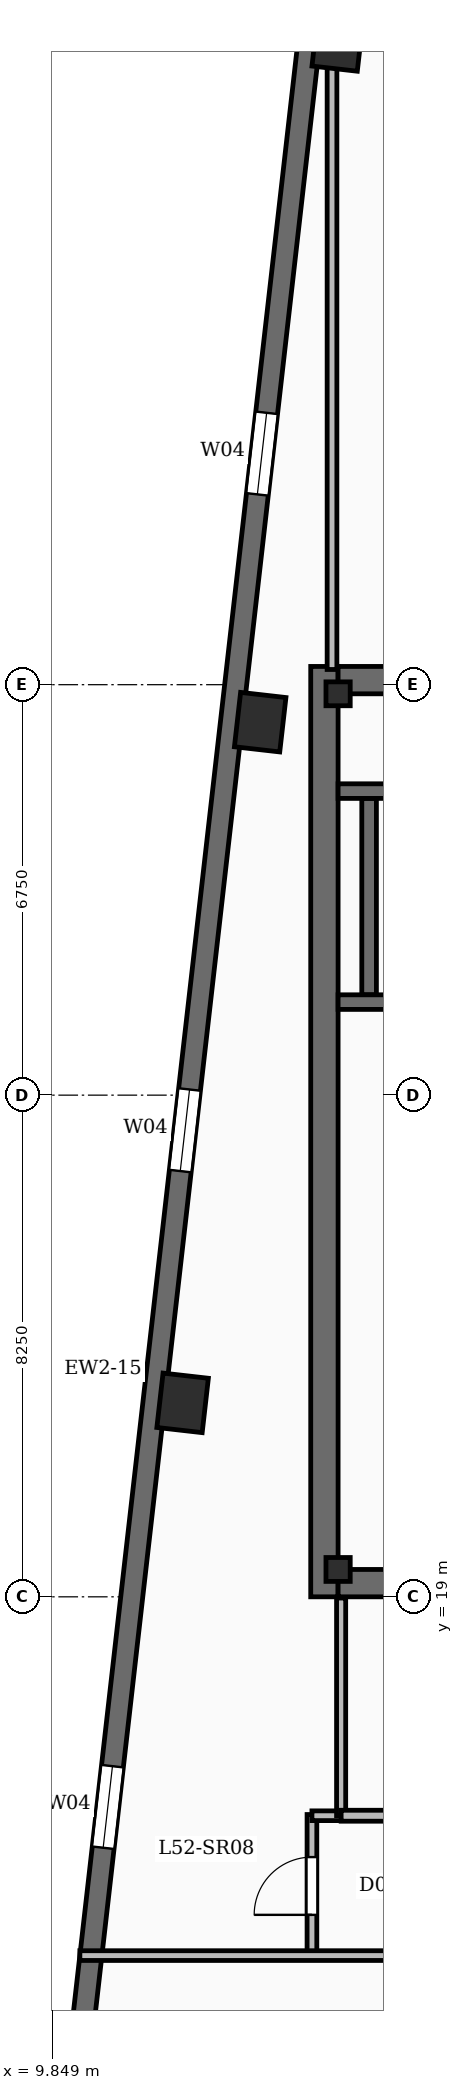
"""IFC4 building model, lengths in metres.
Left out: names, types, materials, properties, quantities, classifications, styles, units other than length and angle.
Written with IfcOpenShell. Run it as: python <this file> out.ifc"""

import sys

from ifc_helpers import new_model, si_unit, direction, frame, frame_2d, origin, origin_2d, place, context, subcontext, project, spatial, rectangle, i_section, extrude, element, fill, save


model = new_model("IFC4")
c1 = context("Model", 3, precision=1e-05, world=origin(), true_north=direction((0.0, 1.0)))
c2 = subcontext(c1, "Body", "Model", "MODEL_VIEW")
j1 = project(units=[si_unit("LENGTHUNIT", "METRE"), si_unit("PLANEANGLEUNIT", "RADIAN")], contexts=[c1])
p1 = place(None, origin())
s1 = spatial("IfcSite", under=j1, at=p1, CompositionType="ELEMENT")
p2 = place(p1, origin())
s2 = spatial("IfcBuilding", under=s1, at=p2, CompositionType="ELEMENT")
p3 = place(p2, frame((0.0, 0.0, 216.15)))
s3 = spatial("IfcBuildingStorey", under=s2, at=p3, CompositionType="ELEMENT", Elevation=216.15)
p4 = place(p3, frame((14.325, 19.0, -0.45), z_axis=(0.0, 0.0, 1.0), x_axis=(0.0, 1.0, 0.0)))
e1 = element("IfcWall", 1, at=p4, inside=s3, PredefinedType="SHEAR", context=c2, shape_type="SweptSolid", body=[
    extrude(rectangle(XDim=15.3, YDim=0.45, at=frame_2d((7.65, 0.0))), origin(), (0.0, 0.0, 1.0), 4.98),
])
for number, where, z_axis, x_axis in (
    (2, (14.55, 19.225, -0.45), (0.0, 0.0, 1.0), (1.0, 0.0, 0.0)),
    (3, (14.55, 34.075, -0.45), (0.0, 0.0, 1.0), (1.0, 0.0, 0.0)),
):
    element("IfcWall", number, at=place(p3, frame(where, z_axis=z_axis, x_axis=x_axis)), inside=s3, PredefinedType="SHEAR", context=c2, shape_type="SweptSolid", body=[
        extrude(rectangle(XDim=9.8, YDim=0.45, at=frame_2d((4.9, 0.0))), origin(), (0.0, 0.0, 1.0), 4.98),
    ])
for number, where, z_axis, x_axis in (
    (4, (14.55, 19.45, -0.45), (0.0, 0.0, 1.0), (1.0, 0.0, 0.0)),
    (5, (14.55, 33.85, -0.45), (0.0, 0.0, 1.0), (1.0, 0.0, 0.0)),
):
    element("IfcColumn", number, at=place(p3, frame(where, z_axis=z_axis, x_axis=x_axis)), inside=s3, PredefinedType="COLUMN", context=c2, shape_type="SweptSolid", body=[
        extrude(i_section(OverallWidth=0.399, OverallDepth=0.393, WebThickness=0.023, FlangeThickness=0.037, FilletRadius=0.02, at=origin_2d()), origin(), (0.0, 0.0, 1.0), 4.98),
    ])
for number, where, z_axis, x_axis in (
    (6, (14.544, 44.578, -0.45), (0.0, 0.0, 1.0), (0.113, 0.994, 0.0)),
    (7, (13.269, 33.384, -0.45), (0.0, 0.0, 1.0), (0.113, 0.994, 0.0)),
    (8, (11.993, 22.189, -0.45), (0.0, 0.0, 1.0), (0.113, 0.994, 0.0)),
):
    element("IfcColumn", number, at=place(p3, frame(where, z_axis=z_axis, x_axis=x_axis)), inside=s3, PredefinedType="COLUMN", context=c2, shape_type="SweptSolid", body=[
        extrude(rectangle(XDim=0.9, YDim=0.75, at=origin_2d()), origin(), (0.0, 0.0, 1.0), 4.98),
    ])
p5 = place(p3, frame((10.211, 10.701, 0.0), z_axis=(0.0, 0.0, 1.0), x_axis=(0.113203107947, 0.993571867733, 0.0)))
e9 = element("IfcWall", 9, at=p5, inside=s3, PredefinedType="SOLIDWALL", context=c2, shape_type="SweptSolid", body=[
    extrude(rectangle(XDim=34.5, YDim=0.36, at=frame_2d((17.25, 0.0))), origin(), (0.0, 0.0, 1.0), 4.53),
])
p6 = place(p5, frame((4.2, 0.0, 0.88)))
e10 = element("IfcOpeningElement", 10, at=p6, cuts=e9, PredefinedType="OPENING", context=c2, shape_type="SweptSolid", body=[
    extrude(rectangle(XDim=1.35, YDim=2.2, at=frame_2d((0.675, 1.1))), frame((0.0, 0.19, 0.0), z_axis=(0.0, -1.0, 0.0), x_axis=(1.0, 0.0, 0.0)), (0.0, 0.0, 1.0), 0.38),
])
p7 = place(p5, frame((15.4, 0.0, 0.88)))
e11 = element("IfcOpeningElement", 11, at=p7, cuts=e9, PredefinedType="OPENING", context=c2, shape_type="SweptSolid", body=[
    extrude(rectangle(XDim=1.35, YDim=2.2, at=frame_2d((0.675, 1.1))), frame((0.0, 0.19, 0.0), z_axis=(0.0, -1.0, 0.0), x_axis=(1.0, 0.0, 0.0)), (0.0, 0.0, 1.0), 0.38),
])
p8 = place(p5, frame((26.6, 0.0, 0.88)))
e12 = element("IfcOpeningElement", 12, at=p8, cuts=e9, PredefinedType="OPENING", context=c2, shape_type="SweptSolid", body=[
    extrude(rectangle(XDim=1.35, YDim=2.2, at=frame_2d((0.675, 1.1))), frame((0.0, 0.19, 0.0), z_axis=(0.0, -1.0, 0.0), x_axis=(1.0, 0.0, 0.0)), (0.0, 0.0, 1.0), 0.38),
])
p9 = place(p3, frame((24.35, 28.78, 0.0), z_axis=(0.0, 0.0, 1.0), x_axis=(-1.0, 0.0, 0.0)))
e13 = element("IfcWall", 13, at=p9, inside=s3, PredefinedType="SOLIDWALL", context=c2, shape_type="SweptSolid", body=[
    extrude(rectangle(XDim=9.8, YDim=0.24, at=frame_2d((4.9, 0.0))), origin(), (0.0, 0.0, 1.0), 4.53),
])
p10 = place(p9, frame((7.83, 0.0, 0.0)))
e14 = element("IfcOpeningElement", 14, at=p10, cuts=e13, PredefinedType="OPENING", context=c2, shape_type="SweptSolid", body=[
    extrude(rectangle(XDim=1.1, YDim=2.15, at=frame_2d((0.55, 1.075))), frame((0.0, 0.13, 0.0), z_axis=(0.0, -1.0, 0.0), x_axis=(1.0, 0.0, 0.0)), (0.0, 0.0, 1.0), 0.26),
])
p11 = place(p3, frame((14.55, 32.25, 0.0), z_axis=(0.0, 0.0, 1.0), x_axis=(1.0, 0.0, 0.0)))
e15 = element("IfcWall", 15, at=p11, inside=s3, PredefinedType="SOLIDWALL", context=c2, shape_type="SweptSolid", body=[
    extrude(rectangle(XDim=9.8, YDim=0.24, at=frame_2d((4.9, 0.0))), origin(), (0.0, 0.0, 1.0), 4.53),
])
p12 = place(p3, frame((15.06, 28.9, 0.0), z_axis=(0.0, 0.0, 1.0), x_axis=(0.0, 1.0, 0.0)))
e16 = element("IfcWall", 16, at=p12, inside=s3, PredefinedType="SOLIDWALL", context=c2, shape_type="SweptSolid", body=[
    extrude(rectangle(XDim=3.23, YDim=0.24, at=frame_2d((1.615, 0.0))), origin(), (0.0, 0.0, 1.0), 4.53),
])
p13 = place(p3, frame((14.6, 15.4, 0.0), z_axis=(0.0, 0.0, 1.0), x_axis=(1.0, 0.0, 0.0)))
e17 = element("IfcWall", 17, at=p13, inside=s3, PredefinedType="PARTITIONING", context=c2, shape_type="SweptSolid", body=[
    extrude(rectangle(XDim=9.9, YDim=0.18, at=frame_2d((4.95, 0.0))), origin(), (0.0, 0.0, 1.0), 3.59),
])
p14 = place(p13, frame((1.99, 0.0, 0.0)))
e18 = element("IfcOpeningElement", 18, at=p14, cuts=e17, PredefinedType="OPENING", context=c2, shape_type="SweptSolid", body=[
    extrude(rectangle(XDim=0.92, YDim=2.1, at=frame_2d((0.46, 1.05))), frame((0.0, 0.1, 0.0), z_axis=(0.0, -1.0, 0.0), x_axis=(1.0, 0.0, 0.0)), (0.0, 0.0, 1.0), 0.2),
])
p15 = place(p13, frame((6.94, 0.0, 0.0)))
e19 = element("IfcOpeningElement", 19, at=p15, cuts=e17, PredefinedType="OPENING", context=c2, shape_type="SweptSolid", body=[
    extrude(rectangle(XDim=0.92, YDim=2.1, at=frame_2d((0.46, 1.05))), frame((0.0, 0.1, 0.0), z_axis=(0.0, -1.0, 0.0), x_axis=(1.0, 0.0, 0.0)), (0.0, 0.0, 1.0), 0.2),
])
p16 = place(p3, frame((14.6, 15.4, 0.0), z_axis=(0.0, 0.0, 1.0), x_axis=(0.0, 1.0, 0.0)))
e20 = element("IfcWall", 20, at=p16, inside=s3, PredefinedType="PARTITIONING", context=c2, shape_type="SweptSolid", body=[
    extrude(rectangle(XDim=3.58, YDim=0.15, at=frame_2d((1.79, 0.0))), origin(), (0.0, 0.0, 1.0), 3.59),
])
p17 = place(p3, frame((14.12, 15.4, 0.0), z_axis=(0.0, 0.0, 1.0), x_axis=(1.0, 0.0, 0.0)))
e21 = element("IfcWall", 21, at=p17, inside=s3, PredefinedType="PARTITIONING", context=c2, shape_type="SweptSolid", body=[
    extrude(rectangle(XDim=0.5, YDim=0.16, at=frame_2d((0.25, 0.0))), origin(), (0.0, 0.0, 1.0), 3.59),
])
p18 = place(p3, frame((10.303, 13.1, 0.0), z_axis=(0.0, 0.0, 1.0), x_axis=(1.0, 0.0, 0.0)))
e22 = element("IfcWall", 22, at=p18, inside=s3, PredefinedType="PARTITIONING", context=c2, shape_type="SweptSolid", body=[
    extrude(rectangle(XDim=57.973, YDim=0.16, at=frame_2d((28.986, 0.0))), origin(), (0.0, 0.0, 1.0), 3.59),
])
p19 = place(p18, frame((14.697, 0.0, 0.0)))
e23 = element("IfcOpeningElement", 23, at=p19, cuts=e22, PredefinedType="OPENING", context=c2, shape_type="SweptSolid", body=[
    extrude(rectangle(XDim=1.6, YDim=2.15, at=frame_2d((0.8, 1.075))), frame((0.0, 0.09, 0.0), z_axis=(0.0, -1.0, 0.0), x_axis=(1.0, 0.0, 0.0)), (0.0, 0.0, 1.0), 0.18),
])
p20 = place(p18, frame((35.697, 0.0, 0.0)))
e24 = element("IfcOpeningElement", 24, at=p20, cuts=e22, PredefinedType="OPENING", context=c2, shape_type="SweptSolid", body=[
    extrude(rectangle(XDim=1.6, YDim=2.15, at=frame_2d((0.8, 1.075))), frame((0.0, 0.09, 0.0), z_axis=(0.0, -1.0, 0.0), x_axis=(1.0, 0.0, 0.0)), (0.0, 0.0, 1.0), 0.18),
])
p21 = place(p3, frame((14.45, 34.25, 0.0), z_axis=(0.0, 0.0, 1.0), x_axis=(0.0, 1.0, 0.0)))
e25 = element("IfcWall", 25, at=p21, inside=s3, PredefinedType="PARTITIONING", context=c2, shape_type="SweptSolid", body=[
    extrude(rectangle(XDim=11.562, YDim=0.16, at=frame_2d((5.781, 0.0))), origin(), (0.0, 0.0, 1.0), 3.59),
])
p22 = place(p3, frame((14.12, 13.12, 0.0), z_axis=(0.0, 0.0, 1.0), x_axis=(0.0, 1.0, 0.0)))
e26 = element("IfcWall", 26, at=p22, inside=s3, PredefinedType="PARTITIONING", context=c2, shape_type="SweptSolid", body=[
    extrude(rectangle(XDim=2.3, YDim=0.16, at=frame_2d((1.15, 0.0))), origin(), (0.0, 0.0, 1.0), 3.59),
])
p23 = place(p22, frame((0.65, 0.0, 0.0)))
e27 = element("IfcOpeningElement", 27, at=p23, cuts=e26, PredefinedType="OPENING", context=c2, shape_type="SweptSolid", body=[
    extrude(rectangle(XDim=0.95, YDim=2.15, at=frame_2d((0.475, 1.075))), frame((0.0, 0.09, 0.0), z_axis=(0.0, -1.0, 0.0), x_axis=(1.0, 0.0, 0.0)), (0.0, 0.0, 1.0), 0.18),
])
p24 = place(p6, origin())
e28 = element("IfcWindow", 28, at=p24, inside=s3, PartitioningType="SINGLE_PANEL", PredefinedType="WINDOW", context=c2, shape_type="SweptSolid", body=[
    extrude(rectangle(XDim=1.35, YDim=2.2, at=frame_2d((0.675, 1.1))), frame((0.0, 0.03, 0.0), z_axis=(0.0, -1.0, 0.0), x_axis=(1.0, 0.0, 0.0)), (0.0, 0.0, 1.0), 0.06),
])
fill(e10, e28)
p25 = place(p7, origin())
e29 = element("IfcWindow", 29, at=p25, inside=s3, PartitioningType="SINGLE_PANEL", PredefinedType="WINDOW", context=c2, shape_type="SweptSolid", body=[
    extrude(rectangle(XDim=1.35, YDim=2.2, at=frame_2d((0.675, 1.1))), frame((0.0, 0.03, 0.0), z_axis=(0.0, -1.0, 0.0), x_axis=(1.0, 0.0, 0.0)), (0.0, 0.0, 1.0), 0.06),
])
fill(e11, e29)
p26 = place(p8, origin())
e30 = element("IfcWindow", 30, at=p26, inside=s3, PartitioningType="SINGLE_PANEL", PredefinedType="WINDOW", context=c2, shape_type="SweptSolid", body=[
    extrude(rectangle(XDim=1.35, YDim=2.2, at=frame_2d((0.675, 1.1))), frame((0.0, 0.03, 0.0), z_axis=(0.0, -1.0, 0.0), x_axis=(1.0, 0.0, 0.0)), (0.0, 0.0, 1.0), 0.06),
])
fill(e12, e30)
p27 = place(p23, origin())
e31 = element("IfcDoor", 31, at=p27, inside=s3, OperationType="SINGLE_SWING_LEFT", PredefinedType="DOOR", context=c2, shape_type="SweptSolid", body=[
    extrude(rectangle(XDim=0.95, YDim=2.15, at=frame_2d((0.475, 1.075))), frame((0.0, 0.025, 0.0), z_axis=(0.0, -1.0, 0.0), x_axis=(1.0, 0.0, 0.0)), (0.0, 0.0, 1.0), 0.05),
])
fill(e27, e31)
save(model, sys.argv[1])
